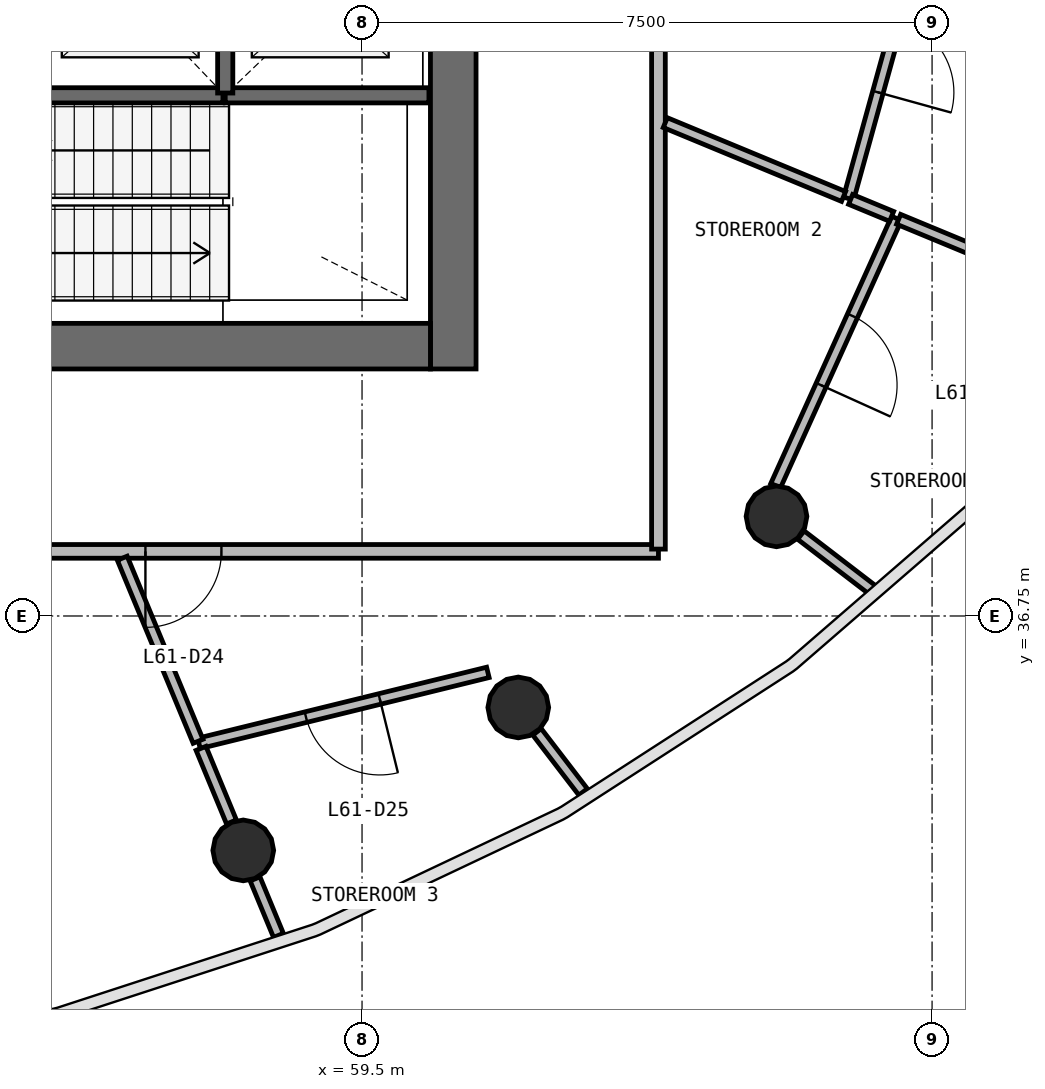
"""IFC4 building model, lengths in metres.
Left out: names, types, materials, properties, quantities, classifications, styles, units other than length and angle.
Written with IfcOpenShell. Run it as: python <this file> out.ifc"""

import sys

from ifc_helpers import new_model, si_unit, direction, frame, frame_2d, origin, origin_2d, place, context, subcontext, project, spatial, rectangle, circle, extrude, source, transform, mapped, element, fill, save


model = new_model("IFC4")
c1 = context("Model", 3, precision=1e-05, world=origin(), true_north=direction((0.0, 1.0)))
c2 = subcontext(c1, "Body", "Model", "MODEL_VIEW")
j1 = project(units=[si_unit("LENGTHUNIT", "METRE"), si_unit("PLANEANGLEUNIT", "RADIAN")], contexts=[c1])
p1 = place(None, origin())
s1 = spatial("IfcSite", under=j1, at=p1, CompositionType="ELEMENT")
p2 = place(p1, origin())
s2 = spatial("IfcBuilding", under=s1, at=p2, CompositionType="ELEMENT")
p3 = place(p2, frame((0.0, 0.0, 250.1)))
s3 = spatial("IfcBuildingStorey", under=s2, at=p3, CompositionType="ELEMENT", Elevation=250.1)
p4 = place(p3, frame((60.7, 40.0, 0.0), z_axis=(0.0, 0.0, 1.0), x_axis=(0.0, 1.0, 0.0)))
e1 = element("IfcWall", 1, at=p4, inside=s3, PredefinedType="SHEAR", context=c2, shape_type="SweptSolid", body=[
    extrude(rectangle(XDim=16.0, YDim=0.6, at=frame_2d((8.0, 0.0))), origin(), (0.0, 0.0, 1.0), 3.9),
])
p5 = place(p4, frame((7.1, 0.0, 0.0)))
e2 = element("IfcOpeningElement", 2, at=p5, cuts=e1, PredefinedType="OPENING", context=c2, shape_type="SweptSolid", body=[
    extrude(rectangle(XDim=1.8, YDim=2.1, at=frame_2d((0.9, 1.05))), frame((0.0, 0.31, 0.0), z_axis=(0.0, -1.0, 0.0), x_axis=(1.0, 0.0, 0.0)), (0.0, 0.0, 1.0), 0.62),
])
p6 = place(p3, frame((43.6, 40.3, 0.0), z_axis=(0.0, 0.0, 1.0), x_axis=(1.0, 0.0, 0.0)))
e3 = element("IfcWall", 3, at=p6, inside=s3, PredefinedType="SHEAR", context=c2, shape_type="SweptSolid", body=[
    extrude(rectangle(XDim=16.8, YDim=0.6, at=frame_2d((8.4, 0.0))), origin(), (0.0, 0.0, 1.0), 3.9),
])
p7 = place(p6, frame((10.3, 0.0, 0.0)))
e4 = element("IfcOpeningElement", 4, at=p7, cuts=e3, PredefinedType="OPENING", context=c2, shape_type="SweptSolid", body=[
    extrude(rectangle(XDim=1.2, YDim=2.1, at=frame_2d((0.6, 1.05))), frame((0.0, 0.31, 0.0), z_axis=(0.0, -1.0, 0.0), x_axis=(1.0, 0.0, 0.0)), (0.0, 0.0, 1.0), 0.62),
])
p8 = place(p6, frame((7.25, 0.0, 0.0)))
e5 = element("IfcOpeningElement", 5, at=p8, cuts=e3, PredefinedType="OPENING", context=c2, shape_type="SweptSolid", body=[
    extrude(rectangle(XDim=1.1, YDim=2.1, at=frame_2d((0.55, 1.05))), frame((0.0, 0.31, 0.0), z_axis=(0.0, -1.0, 0.0), x_axis=(1.0, 0.0, 0.0)), (0.0, 0.0, 1.0), 0.62),
])
p9 = place(p6, frame((0.7, 0.0, 0.0)))
e6 = element("IfcOpeningElement", 6, at=p9, cuts=e3, PredefinedType="OPENING", context=c2, shape_type="SweptSolid", body=[
    extrude(rectangle(XDim=0.8, YDim=2.1, at=frame_2d((0.4, 1.05))), frame((0.0, 0.31, 0.0), z_axis=(0.0, -1.0, 0.0), x_axis=(1.0, 0.0, 0.0)), (0.0, 0.0, 1.0), 0.62),
])
m1 = source(origin(), c2, "Body", "SweptSolid", [
    extrude(circle(Radius=0.4, at=origin_2d()), origin(), (0.0, 0.0, 1.0), 3.9),
])
for number, where, z_axis, x_axis in (
    (7, (57.937, 33.666, 0.0), (0.0, 0.0, 1.0), (1.0, 0.0, 0.0)),
    (8, (61.556, 35.547, 0.0), (0.0, 0.0, 1.0), (1.0, 0.0, 0.0)),
    (9, (64.953, 38.061, 0.0), (0.0, 0.0, 1.0), (1.0, 0.0, 0.0)),
):
    element("IfcColumn", number, at=place(p3, frame(where, z_axis=z_axis, x_axis=x_axis)), inside=s3, PredefinedType="COLUMN", context=c2, shape_type="MappedRepresentation", body=[
        mapped(m1, transform((0.0, 0.0, 0.0), scale=1.0)),
    ])
p10 = place(p3, frame((57.7, 43.6, 0.0), z_axis=(0.0, 0.0, 1.0), x_axis=(1.0, 0.0, 0.0)))
e10 = element("IfcWall", 10, at=p10, inside=s3, PredefinedType="SOLIDWALL", context=c2, shape_type="SweptSolid", body=[
    extrude(rectangle(XDim=2.68, YDim=0.2, at=frame_2d((1.34, 0.0))), origin(), (0.0, 0.0, 1.0), 3.58),
])
p11 = place(p3, frame((55.2, 43.6, 0.0), z_axis=(0.0, 0.0, 1.0), x_axis=(1.0, 0.0, 0.0)))
e11 = element("IfcWall", 11, at=p11, inside=s3, PredefinedType="SOLIDWALL", context=c2, shape_type="SweptSolid", body=[
    extrude(rectangle(XDim=2.47, YDim=0.2, at=frame_2d((1.235, 0.0))), origin(), (0.0, 0.0, 1.0), 3.58),
])
p12 = place(p3, frame((57.7, 43.63, 0.0), z_axis=(0.0, 0.0, 1.0), x_axis=(0.0, 1.0, 0.0)))
e12 = element("IfcWall", 12, at=p12, inside=s3, PredefinedType="SOLIDWALL", context=c2, shape_type="SweptSolid", body=[
    extrude(rectangle(XDim=2.36, YDim=0.2, at=frame_2d((1.18, 0.0))), origin(), (0.0, 0.0, 1.0), 3.58),
])
p13 = place(p3, frame((63.4, 37.6, 0.0), z_axis=(0.0, 0.0, 1.0), x_axis=(-1.0, 0.0, 0.0)))
e13 = element("IfcWall", 13, at=p13, inside=s3, PredefinedType="PARTITIONING", context=c2, shape_type="SweptSolid", body=[
    extrude(rectangle(XDim=22.8, YDim=0.18, at=frame_2d((11.4, 0.0))), origin(), (0.0, 0.0, 1.0), 2.88),
])
p14 = place(p13, frame((19.95, 0.0, 0.0)))
e14 = element("IfcOpeningElement", 14, at=p14, cuts=e13, PredefinedType="OPENING", context=c2, shape_type="SweptSolid", body=[
    extrude(rectangle(XDim=1.0, YDim=2.1, at=frame_2d((0.5, 1.05))), frame((0.0, 0.1, 0.0), z_axis=(0.0, -1.0, 0.0), x_axis=(1.0, 0.0, 0.0)), (0.0, 0.0, 1.0), 0.2),
])
p15 = place(p13, frame((10.95, 0.0, 0.0)))
e15 = element("IfcOpeningElement", 15, at=p15, cuts=e13, PredefinedType="OPENING", context=c2, shape_type="SweptSolid", body=[
    extrude(rectangle(XDim=1.0, YDim=2.1, at=frame_2d((0.5, 1.05))), frame((0.0, 0.1, 0.0), z_axis=(0.0, -1.0, 0.0), x_axis=(1.0, 0.0, 0.0)), (0.0, 0.0, 1.0), 0.2),
])
p16 = place(p13, frame((5.75, 0.0, 0.0)))
e16 = element("IfcOpeningElement", 16, at=p16, cuts=e13, PredefinedType="OPENING", context=c2, shape_type="SweptSolid", body=[
    extrude(rectangle(XDim=1.0, YDim=2.1, at=frame_2d((0.5, 1.05))), frame((0.0, 0.1, 0.0), z_axis=(0.0, -1.0, 0.0), x_axis=(1.0, 0.0, 0.0)), (0.0, 0.0, 1.0), 0.2),
])
p17 = place(p3, frame((63.4, 58.37, 0.0), z_axis=(0.0, 0.0, 1.0), x_axis=(0.0, -1.0, 0.0)))
e17 = element("IfcWall", 17, at=p17, inside=s3, PredefinedType="PARTITIONING", context=c2, shape_type="SweptSolid", body=[
    extrude(rectangle(XDim=20.74, YDim=0.18, at=frame_2d((10.37, 0.0))), origin(), (0.0, 0.0, 1.0), 2.88),
])
p18 = place(p17, frame((9.89, 0.0, 0.0)))
e18 = element("IfcOpeningElement", 18, at=p18, cuts=e17, PredefinedType="OPENING", context=c2, shape_type="SweptSolid", body=[
    extrude(rectangle(XDim=1.0, YDim=2.1, at=frame_2d((0.5, 1.05))), frame((0.0, 0.1, 0.0), z_axis=(0.0, -1.0, 0.0), x_axis=(1.0, 0.0, 0.0)), (0.0, 0.0, 1.0), 0.2),
])
p19 = place(p17, frame((7.69, 0.0, 0.0)))
e19 = element("IfcOpeningElement", 19, at=p19, cuts=e17, PredefinedType="OPENING", context=c2, shape_type="SweptSolid", body=[
    extrude(rectangle(XDim=1.0, YDim=2.1, at=frame_2d((0.5, 1.05))), frame((0.0, 0.1, 0.0), z_axis=(0.0, -1.0, 0.0), x_axis=(1.0, 0.0, 0.0)), (0.0, 0.0, 1.0), 0.2),
])
p20 = place(p3, frame((66.941, 46.003, 0.0), z_axis=(0.0, 0.0, 1.0), x_axis=(-0.266530407872, -0.963826510156, 0.0)))
e20 = element("IfcWall", 20, at=p20, inside=s3, PredefinedType="PARTITIONING", context=c2, shape_type="SweptSolid", body=[
    extrude(rectangle(XDim=3.902, YDim=0.14, at=frame_2d((1.951, 0.0))), origin(), (0.0, 0.0, 1.0), 2.88),
])
p21 = place(p20, frame((1.452, 0.0, 0.0)))
e21 = element("IfcOpeningElement", 21, at=p21, cuts=e20, PredefinedType="OPENING", context=c2, shape_type="SweptSolid", body=[
    extrude(rectangle(XDim=1.0, YDim=2.1, at=frame_2d((0.5, 1.05))), frame((0.0, 0.08, 0.0), z_axis=(0.0, -1.0, 0.0), x_axis=(1.0, 0.0, 0.0)), (0.0, 0.0, 1.0), 0.16),
])
p22 = place(p3, frame((61.156, 36.008, 0.0), z_axis=(0.0, 0.0, 1.0), x_axis=(-0.97111056308, -0.238629994499, 0.0)))
e22 = element("IfcWall", 22, at=p22, inside=s3, PredefinedType="PARTITIONING", context=c2, shape_type="SweptSolid", body=[
    extrude(rectangle(XDim=3.914, YDim=0.14, at=frame_2d((1.957, 0.0))), origin(), (0.0, 0.0, 1.0), 2.88),
])
p23 = place(p22, frame((1.465, 0.0, 0.0)))
e23 = element("IfcOpeningElement", 23, at=p23, cuts=e22, PredefinedType="OPENING", context=c2, shape_type="SweptSolid", body=[
    extrude(rectangle(XDim=1.0, YDim=2.1, at=frame_2d((0.5, 1.05))), frame((0.0, 0.08, 0.0), z_axis=(0.0, -1.0, 0.0), x_axis=(1.0, 0.0, 0.0)), (0.0, 0.0, 1.0), 0.16),
])
p24 = place(p3, frame((66.532, 41.98, 0.0), z_axis=(0.0, 0.0, 1.0), x_axis=(-0.412147858133, -0.911116975496, 0.0)))
e24 = element("IfcWall", 24, at=p24, inside=s3, PredefinedType="PARTITIONING", context=c2, shape_type="SweptSolid", body=[
    extrude(rectangle(XDim=3.858, YDim=0.14, at=frame_2d((1.929, 0.0))), origin(), (0.0, 0.0, 1.0), 2.88),
])
p25 = place(p24, frame((1.408, 0.0, 0.0)))
e25 = element("IfcOpeningElement", 25, at=p25, cuts=e24, PredefinedType="OPENING", context=c2, shape_type="SweptSolid", body=[
    extrude(rectangle(XDim=1.0, YDim=2.1, at=frame_2d((0.5, 1.05))), frame((0.0, 0.08, 0.0), z_axis=(0.0, -1.0, 0.0), x_axis=(1.0, 0.0, 0.0)), (0.0, 0.0, 1.0), 0.16),
])
p26 = place(p3, frame((56.345, 37.51, 0.0), z_axis=(0.0, 0.0, 1.0), x_axis=(0.382666102352, -0.923886710647, 0.0)))
e26 = element("IfcWall", 26, at=p26, inside=s3, PredefinedType="PARTITIONING", context=c2, shape_type="SweptSolid", body=[
    extrude(rectangle(XDim=2.607, YDim=0.14, at=frame_2d((1.303, 0.0))), origin(), (0.0, 0.0, 1.0), 2.88),
])
p27 = place(p3, frame((63.49, 43.241, 0.0), z_axis=(0.0, 0.0, 1.0), x_axis=(0.923857420899, -0.382736810157, 0.0)))
e27 = element("IfcWall", 27, at=p27, inside=s3, PredefinedType="PARTITIONING", context=c2, shape_type="SweptSolid", body=[
    extrude(rectangle(XDim=2.539, YDim=0.14, at=frame_2d((1.27, 0.0))), origin(), (0.0, 0.0, 1.0), 2.88),
])
p28 = place(p3, frame((66.56, 41.969, 0.0), z_axis=(0.0, 0.0, 1.0), x_axis=(0.923839645741, -0.382779713358, 0.0)))
e28 = element("IfcWall", 28, at=p28, inside=s3, PredefinedType="PARTITIONING", context=c2, shape_type="SweptSolid", body=[
    extrude(rectangle(XDim=1.209, YDim=0.14, at=frame_2d((0.604, 0.0))), origin(), (0.0, 0.0, 1.0), 2.88),
])
p29 = place(p3, frame((65.274, 37.814, 0.0), z_axis=(0.0, 0.0, 1.0), x_axis=(0.793454460627, -0.608629623754, 0.0)))
e29 = element("IfcWall", 29, at=p29, inside=s3, PredefinedType="PARTITIONING", context=c2, shape_type="SweptSolid", body=[
    extrude(rectangle(XDim=1.19, YDim=0.14, at=frame_2d((0.595, 0.0))), origin(), (0.0, 0.0, 1.0), 2.88),
])
p30 = place(p3, frame((57.381, 35.008, 0.0), z_axis=(0.0, 0.0, 1.0), x_axis=(0.382612471688, -0.923908922194, 0.0)))
e30 = element("IfcWall", 30, at=p30, inside=s3, PredefinedType="PARTITIONING", context=c2, shape_type="SweptSolid", body=[
    extrude(rectangle(XDim=1.048, YDim=0.14, at=frame_2d((0.524, 0.0))), origin(), (0.0, 0.0, 1.0), 2.88),
])
p31 = place(p3, frame((61.802, 35.226, 0.0), z_axis=(0.0, 0.0, 1.0), x_axis=(0.608704056843, -0.793397360207, 0.0)))
e31 = element("IfcWall", 31, at=p31, inside=s3, PredefinedType="PARTITIONING", context=c2, shape_type="SweptSolid", body=[
    extrude(rectangle(XDim=0.997, YDim=0.14, at=frame_2d((0.498, 0.0))), origin(), (0.0, 0.0, 1.0), 2.88),
])
p32 = place(p3, frame((58.092, 33.292, 0.0), z_axis=(0.0, 0.0, 1.0), x_axis=(0.382548125173, -0.923935566978, 0.0)))
e32 = element("IfcWall", 32, at=p32, inside=s3, PredefinedType="PARTITIONING", context=c2, shape_type="SweptSolid", body=[
    extrude(rectangle(XDim=0.805, YDim=0.14, at=frame_2d((0.403, 0.0))), origin(), (0.0, 0.0, 1.0), 2.88),
])
p33 = place(p3, frame((65.928, 42.231, 0.0), z_axis=(0.0, 0.0, 1.0), x_axis=(0.923817916436, -0.382832152871, 0.0)))
e33 = element("IfcWall", 33, at=p33, inside=s3, PredefinedType="PARTITIONING", context=c2, shape_type="SweptSolid", body=[
    extrude(rectangle(XDim=0.583, YDim=0.14, at=frame_2d((0.292, 0.0))), origin(), (0.0, 0.0, 1.0), 2.88),
])
m2 = source(origin(), c2, "Body", "SweptSolid", [
    extrude(rectangle(XDim=1.0, YDim=2.1, at=frame_2d((0.5, 1.05))), frame((0.0, 0.025, 0.0), z_axis=(0.0, -1.0, 0.0), x_axis=(1.0, 0.0, 0.0)), (0.0, 0.0, 1.0), 0.05),
])
p34 = place(p16, origin())
e34 = element("IfcDoor", 34, at=p34, inside=s3, OperationType="SINGLE_SWING_RIGHT", PredefinedType="DOOR", context=c2, shape_type="MappedRepresentation", body=[
    mapped(m2, transform((0.0, 0.0, 0.0), scale=1.0)),
])
fill(e16, e34)
p35 = place(p23, origin())
e35 = element("IfcDoor", 35, at=p35, inside=s3, OperationType="SINGLE_SWING_LEFT", PredefinedType="DOOR", context=c2, shape_type="MappedRepresentation", body=[
    mapped(m2, transform((0.0, 0.0, 0.0), scale=1.0)),
])
fill(e23, e35)
p36 = place(p25, origin())
e36 = element("IfcDoor", 36, at=p36, inside=s3, OperationType="SINGLE_SWING_RIGHT", PredefinedType="DOOR", context=c2, shape_type="MappedRepresentation", body=[
    mapped(m2, transform((0.0, 0.0, 0.0), scale=1.0)),
])
fill(e25, e36)
p37 = place(p21, origin())
e37 = element("IfcDoor", 37, at=p37, inside=s3, OperationType="SINGLE_SWING_RIGHT", PredefinedType="DOOR", context=c2, shape_type="MappedRepresentation", body=[
    mapped(m2, transform((0.0, 0.0, 0.0), scale=1.0)),
])
fill(e21, e37)
save(model, sys.argv[1])
